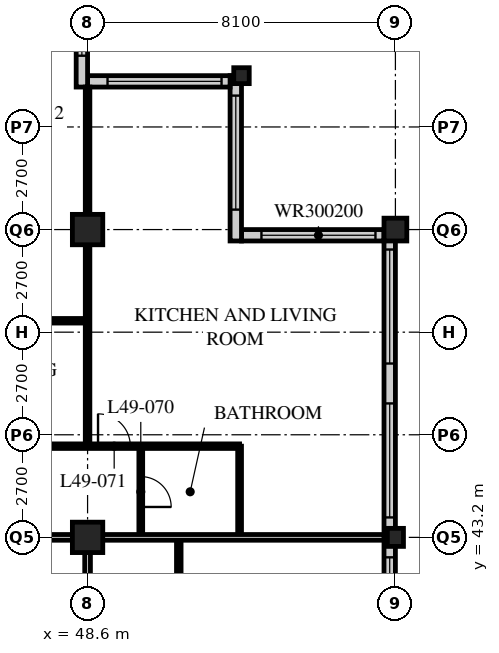
"""IFC4 building model, lengths in metres.
Left out: names, types, materials, properties, quantities, classifications, styles, units other than length and angle.
Written with IfcOpenShell. Run it as: python <this file> out.ifc"""

import sys

from ifc_helpers import new_model, si_unit, direction, frame, frame_2d, origin, origin_2d, place, context, subcontext, project, spatial, rectangle, hollow_rectangle, i_section, extrude, element, fill, save


model = new_model("IFC4")
c1 = context("Model", 3, precision=1e-05, world=origin(), true_north=direction((0.0, 1.0)))
c2 = subcontext(c1, "Body", "Model", "MODEL_VIEW")
j1 = project(units=[si_unit("LENGTHUNIT", "METRE"), si_unit("PLANEANGLEUNIT", "RADIAN")], contexts=[c1])
p1 = place(None, origin())
s1 = spatial("IfcSite", under=j1, at=p1, CompositionType="ELEMENT")
p2 = place(p1, origin())
s2 = spatial("IfcBuilding", under=s1, at=p2, CompositionType="ELEMENT")
p3 = place(p2, frame((0.0, 0.0, 192.0)))
s3 = spatial("IfcBuildingStorey", under=s2, at=p3, CompositionType="ELEMENT", Elevation=192.0)
for number, where, z_axis, x_axis in (
    (1, (48.6, 43.2, 0.0), (0.0, 0.0, 1.0), (1.0, 0.0, 0.0)),
    (2, (48.6, 51.3, 0.0), (0.0, 0.0, 1.0), (1.0, 0.0, 0.0)),
):
    element("IfcColumn", number, at=place(p3, frame(where, z_axis=z_axis, x_axis=x_axis)), inside=s3, PredefinedType="COLUMN", context=c2, shape_type="SweptSolid", body=[
        extrude(hollow_rectangle(XDim=0.8, YDim=0.8, WallThickness=0.08, at=origin_2d()), origin(), (0.0, 0.0, 1.0), 3.6),
    ])
p4 = place(p3, frame((52.65, 55.35, 0.0), z_axis=(0.0, 0.0, 1.0), x_axis=(1.0, 0.0, 0.0)))
e3 = element("IfcColumn", 3, at=p4, inside=s3, PredefinedType="COLUMN", context=c2, shape_type="SweptSolid", body=[
    extrude(i_section(OverallWidth=0.407, OverallDepth=0.419, WebThickness=0.031, FlangeThickness=0.049, FilletRadius=0.015, at=origin_2d()), origin(), (0.0, 0.0, 1.0), 3.6),
])
p5 = place(p3, frame((56.7, 43.2, 0.0), z_axis=(0.0, 0.0, 1.0), x_axis=(1.0, 0.0, 0.0)))
e4 = element("IfcColumn", 4, at=p5, inside=s3, PredefinedType="COLUMN", context=c2, shape_type="SweptSolid", body=[
    extrude(i_section(OverallWidth=0.424, OverallDepth=0.475, WebThickness=0.048, FlangeThickness=0.077, FilletRadius=0.015, at=origin_2d()), origin(), (0.0, 0.0, 1.0), 3.6),
])
p6 = place(p3, frame((56.7, 51.3, 0.0), z_axis=(0.0, 0.0, 1.0), x_axis=(1.0, 0.0, 0.0)))
e5 = element("IfcColumn", 5, at=p6, inside=s3, PredefinedType="COLUMN", context=c2, shape_type="SweptSolid", body=[
    extrude(hollow_rectangle(XDim=0.6, YDim=0.6, WallThickness=0.05, at=origin_2d()), origin(), (0.0, 0.0, 1.0), 3.6),
])
p7 = place(p3, frame((56.55, 19.2, 0.0), z_axis=(0.0, 0.0, 1.0), x_axis=(0.0, 1.0, 0.0)))
e6 = element("IfcWall", 6, at=p7, inside=s3, PredefinedType="SOLIDWALL", context=c2, shape_type="SweptSolid", body=[
    extrude(rectangle(XDim=32.1, YDim=0.3, at=frame_2d((16.05, 0.0))), origin(), (0.0, 0.0, 1.0), 3.39),
])
p8 = place(p7, frame((0.225, 0.0, 0.6)))
e7 = element("IfcOpeningElement", 7, at=p8, cuts=e6, PredefinedType="OPENING", context=c2, shape_type="SweptSolid", body=[
    extrude(rectangle(XDim=3.0, YDim=2.4, at=frame_2d((1.5, 1.2))), frame((0.0, 0.16, 0.0), z_axis=(0.0, -1.0, 0.0), x_axis=(1.0, 0.0, 0.0)), (0.0, 0.0, 1.0), 0.32),
])
p9 = place(p7, frame((4.275, 0.0, 0.6)))
e8 = element("IfcOpeningElement", 8, at=p9, cuts=e6, PredefinedType="OPENING", context=c2, shape_type="SweptSolid", body=[
    extrude(rectangle(XDim=3.0, YDim=2.4, at=frame_2d((1.5, 1.2))), frame((0.0, 0.16, 0.0), z_axis=(0.0, -1.0, 0.0), x_axis=(1.0, 0.0, 0.0)), (0.0, 0.0, 1.0), 0.32),
])
p10 = place(p7, frame((8.325, 0.0, 0.6)))
e9 = element("IfcOpeningElement", 9, at=p10, cuts=e6, PredefinedType="OPENING", context=c2, shape_type="SweptSolid", body=[
    extrude(rectangle(XDim=3.0, YDim=2.4, at=frame_2d((1.5, 1.2))), frame((0.0, 0.16, 0.0), z_axis=(0.0, -1.0, 0.0), x_axis=(1.0, 0.0, 0.0)), (0.0, 0.0, 1.0), 0.32),
])
p11 = place(p7, frame((12.375, 0.0, 0.6)))
e10 = element("IfcOpeningElement", 10, at=p11, cuts=e6, PredefinedType="OPENING", context=c2, shape_type="SweptSolid", body=[
    extrude(rectangle(XDim=3.0, YDim=2.4, at=frame_2d((1.5, 1.2))), frame((0.0, 0.16, 0.0), z_axis=(0.0, -1.0, 0.0), x_axis=(1.0, 0.0, 0.0)), (0.0, 0.0, 1.0), 0.32),
])
p12 = place(p7, frame((16.425, 0.0, 0.6)))
e11 = element("IfcOpeningElement", 11, at=p12, cuts=e6, PredefinedType="OPENING", context=c2, shape_type="SweptSolid", body=[
    extrude(rectangle(XDim=3.0, YDim=2.4, at=frame_2d((1.5, 1.2))), frame((0.0, 0.16, 0.0), z_axis=(0.0, -1.0, 0.0), x_axis=(1.0, 0.0, 0.0)), (0.0, 0.0, 1.0), 0.32),
])
p13 = place(p7, frame((20.475, 0.0, 0.6)))
e12 = element("IfcOpeningElement", 12, at=p13, cuts=e6, PredefinedType="OPENING", context=c2, shape_type="SweptSolid", body=[
    extrude(rectangle(XDim=3.0, YDim=2.4, at=frame_2d((1.5, 1.2))), frame((0.0, 0.16, 0.0), z_axis=(0.0, -1.0, 0.0), x_axis=(1.0, 0.0, 0.0)), (0.0, 0.0, 1.0), 0.32),
])
p14 = place(p7, frame((24.525, 0.0, 0.6)))
e13 = element("IfcOpeningElement", 13, at=p14, cuts=e6, PredefinedType="OPENING", context=c2, shape_type="SweptSolid", body=[
    extrude(rectangle(XDim=3.0, YDim=2.4, at=frame_2d((1.5, 1.2))), frame((0.0, 0.16, 0.0), z_axis=(0.0, -1.0, 0.0), x_axis=(1.0, 0.0, 0.0)), (0.0, 0.0, 1.0), 0.32),
])
p15 = place(p7, frame((28.575, 0.0, 0.6)))
e14 = element("IfcOpeningElement", 14, at=p15, cuts=e6, PredefinedType="OPENING", context=c2, shape_type="SweptSolid", body=[
    extrude(rectangle(XDim=3.0, YDim=2.4, at=frame_2d((1.5, 1.2))), frame((0.0, 0.16, 0.0), z_axis=(0.0, -1.0, 0.0), x_axis=(1.0, 0.0, 0.0)), (0.0, 0.0, 1.0), 0.32),
])
p16 = place(p3, frame((56.4, 51.15, 0.0), z_axis=(0.0, 0.0, 1.0), x_axis=(-1.0, 0.0, 0.0)))
e15 = element("IfcWall", 15, at=p16, inside=s3, PredefinedType="SOLIDWALL", context=c2, shape_type="SweptSolid", body=[
    extrude(rectangle(XDim=3.75, YDim=0.3, at=frame_2d((1.875, 0.0))), origin(), (0.0, 0.0, 1.0), 3.39),
])
p17 = place(p16, frame((0.225, 0.0, 0.6)))
e16 = element("IfcOpeningElement", 16, at=p17, cuts=e15, PredefinedType="OPENING", context=c2, shape_type="SweptSolid", body=[
    extrude(rectangle(XDim=3.0, YDim=2.0, at=frame_2d((1.5, 1.0))), frame((0.0, 0.16, 0.0), z_axis=(0.0, -1.0, 0.0), x_axis=(1.0, 0.0, 0.0)), (0.0, 0.0, 1.0), 0.32),
])
p18 = place(p3, frame((52.5, 51.0, 0.0), z_axis=(0.0, 0.0, 1.0), x_axis=(0.0, 1.0, 0.0)))
e17 = element("IfcWall", 17, at=p18, inside=s3, PredefinedType="SOLIDWALL", context=c2, shape_type="SweptSolid", body=[
    extrude(rectangle(XDim=4.35, YDim=0.3, at=frame_2d((2.175, 0.0))), origin(), (0.0, 0.0, 1.0), 3.39),
])
p19 = place(p18, frame((0.825, 0.0, 0.6)))
e18 = element("IfcOpeningElement", 18, at=p19, cuts=e17, PredefinedType="OPENING", context=c2, shape_type="SweptSolid", body=[
    extrude(rectangle(XDim=3.0, YDim=2.0, at=frame_2d((1.5, 1.0))), frame((0.0, 0.16, 0.0), z_axis=(0.0, -1.0, 0.0), x_axis=(1.0, 0.0, 0.0)), (0.0, 0.0, 1.0), 0.32),
])
p20 = place(p3, frame((52.35, 55.2, 0.0), z_axis=(0.0, 0.0, 1.0), x_axis=(-1.0, 0.0, 0.0)))
e19 = element("IfcWall", 19, at=p20, inside=s3, PredefinedType="SOLIDWALL", context=c2, shape_type="SweptSolid", body=[
    extrude(rectangle(XDim=3.75, YDim=0.3, at=frame_2d((1.875, 0.0))), origin(), (0.0, 0.0, 1.0), 3.39),
])
p21 = place(p20, frame((0.225, 0.0, 0.6)))
e20 = element("IfcOpeningElement", 20, at=p21, cuts=e19, PredefinedType="OPENING", context=c2, shape_type="SweptSolid", body=[
    extrude(rectangle(XDim=3.0, YDim=2.0, at=frame_2d((1.5, 1.0))), frame((0.0, 0.16, 0.0), z_axis=(0.0, -1.0, 0.0), x_axis=(1.0, 0.0, 0.0)), (0.0, 0.0, 1.0), 0.32),
])
p22 = place(p3, frame((48.45, 55.05, 0.0), z_axis=(0.0, 0.0, 1.0), x_axis=(0.0, 1.0, 0.0)))
e21 = element("IfcWall", 21, at=p22, inside=s3, PredefinedType="SOLIDWALL", context=c2, shape_type="SweptSolid", body=[
    extrude(rectangle(XDim=4.35, YDim=0.3, at=frame_2d((2.175, 0.0))), origin(), (0.0, 0.0, 1.0), 3.39),
])
p23 = place(p22, frame((0.825, 0.0, 0.6)))
e22 = element("IfcOpeningElement", 22, at=p23, cuts=e21, PredefinedType="OPENING", context=c2, shape_type="SweptSolid", body=[
    extrude(rectangle(XDim=3.0, YDim=2.0, at=frame_2d((1.5, 1.0))), frame((0.0, 0.16, 0.0), z_axis=(0.0, -1.0, 0.0), x_axis=(1.0, 0.0, 0.0)), (0.0, 0.0, 1.0), 0.32),
])
p24 = place(p3, frame((8.1, 43.2, 0.0), z_axis=(0.0, 0.0, 1.0), x_axis=(1.0, 0.0, 0.0)))
e23 = element("IfcWall", 23, at=p24, inside=s3, PredefinedType="PARTITIONING", context=c2, shape_type="SweptSolid", body=[
    extrude(rectangle(XDim=40.5, YDim=0.15, at=frame_2d((20.25, 0.0))), origin(), (0.0, 0.0, 1.0), 2.778),
])
p25 = place(p24, frame((4.45, 0.0, 0.0)))
e24 = element("IfcOpeningElement", 24, at=p25, cuts=e23, PredefinedType="OPENING", context=c2, shape_type="SweptSolid", body=[
    extrude(rectangle(XDim=1.0, YDim=2.1, at=frame_2d((0.5, 1.05))), frame((0.0, 0.085, 0.0), z_axis=(0.0, -1.0, 0.0), x_axis=(1.0, 0.0, 0.0)), (0.0, 0.0, 1.0), 0.17),
])
p26 = place(p24, frame((20.65, 0.0, 0.0)))
e25 = element("IfcOpeningElement", 25, at=p26, cuts=e23, PredefinedType="OPENING", context=c2, shape_type="SweptSolid", body=[
    extrude(rectangle(XDim=1.0, YDim=2.1, at=frame_2d((0.5, 1.05))), frame((0.0, 0.085, 0.0), z_axis=(0.0, -1.0, 0.0), x_axis=(1.0, 0.0, 0.0)), (0.0, 0.0, 1.0), 0.17),
])
p27 = place(p24, frame((28.75, 0.0, 0.0)))
e26 = element("IfcOpeningElement", 26, at=p27, cuts=e23, PredefinedType="OPENING", context=c2, shape_type="SweptSolid", body=[
    extrude(rectangle(XDim=1.0, YDim=2.1, at=frame_2d((0.5, 1.05))), frame((0.0, 0.085, 0.0), z_axis=(0.0, -1.0, 0.0), x_axis=(1.0, 0.0, 0.0)), (0.0, 0.0, 1.0), 0.17),
])
p28 = place(p24, frame((37.975, 0.0, 0.0)))
e27 = element("IfcOpeningElement", 27, at=p28, cuts=e23, PredefinedType="OPENING", context=c2, shape_type="SweptSolid", body=[
    extrude(rectangle(XDim=1.0, YDim=2.1, at=frame_2d((0.5, 1.05))), frame((0.0, 0.085, 0.0), z_axis=(0.0, -1.0, 0.0), x_axis=(1.0, 0.0, 0.0)), (0.0, 0.0, 1.0), 0.17),
])
p29 = place(p24, frame((1.525, 0.0, 0.0)))
e28 = element("IfcOpeningElement", 28, at=p29, cuts=e23, PredefinedType="OPENING", context=c2, shape_type="SweptSolid", body=[
    extrude(rectangle(XDim=1.0, YDim=2.1, at=frame_2d((0.5, 1.05))), frame((0.0, 0.085, 0.0), z_axis=(0.0, -1.0, 0.0), x_axis=(1.0, 0.0, 0.0)), (0.0, 0.0, 1.0), 0.17),
])
p30 = place(p3, frame((48.6, 18.9, 0.0), z_axis=(0.0, 0.0, 1.0), x_axis=(0.0, 1.0, 0.0)))
e29 = element("IfcWall", 29, at=p30, inside=s3, PredefinedType="PARTITIONING", context=c2, shape_type="SweptSolid", body=[
    extrude(rectangle(XDim=24.3, YDim=0.15, at=frame_2d((12.15, 0.0))), origin(), (0.0, 0.0, 1.0), 2.778),
])
p31 = place(p30, frame((2.35, 0.0, 0.0)))
e30 = element("IfcOpeningElement", 30, at=p31, cuts=e29, PredefinedType="OPENING", context=c2, shape_type="SweptSolid", body=[
    extrude(rectangle(XDim=1.0, YDim=2.1, at=frame_2d((0.5, 1.05))), frame((0.0, 0.085, 0.0), z_axis=(0.0, -1.0, 0.0), x_axis=(1.0, 0.0, 0.0)), (0.0, 0.0, 1.0), 0.17),
])
p32 = place(p30, frame((4.75, 0.0, 0.0)))
e31 = element("IfcOpeningElement", 31, at=p32, cuts=e29, PredefinedType="OPENING", context=c2, shape_type="SweptSolid", body=[
    extrude(rectangle(XDim=1.0, YDim=2.1, at=frame_2d((0.5, 1.05))), frame((0.0, 0.085, 0.0), z_axis=(0.0, -1.0, 0.0), x_axis=(1.0, 0.0, 0.0)), (0.0, 0.0, 1.0), 0.17),
])
p33 = place(p30, frame((9.0, 0.0, 0.0)))
e32 = element("IfcOpeningElement", 32, at=p33, cuts=e29, PredefinedType="OPENING", context=c2, shape_type="SweptSolid", body=[
    extrude(rectangle(XDim=1.0, YDim=2.1, at=frame_2d((0.5, 1.05))), frame((0.0, 0.085, 0.0), z_axis=(0.0, -1.0, 0.0), x_axis=(1.0, 0.0, 0.0)), (0.0, 0.0, 1.0), 0.17),
])
p34 = place(p3, frame((51.0, 27.0, 0.0), z_axis=(0.0, 0.0, 1.0), x_axis=(0.0, 1.0, 0.0)))
e33 = element("IfcWall", 33, at=p34, inside=s3, PredefinedType="PARTITIONING", context=c2, shape_type="SweptSolid", body=[
    extrude(rectangle(XDim=16.2, YDim=0.12, at=frame_2d((8.1, 0.0))), origin(), (0.0, 0.0, 1.0), 3.39),
])
p35 = place(p34, frame((0.975, 0.0, 0.0)))
e34 = element("IfcOpeningElement", 34, at=p35, cuts=e33, PredefinedType="OPENING", context=c2, shape_type="SweptSolid", body=[
    extrude(rectangle(XDim=0.85, YDim=2.1, at=frame_2d((0.425, 1.05))), frame((0.0, 0.07, 0.0), z_axis=(0.0, -1.0, 0.0), x_axis=(1.0, 0.0, 0.0)), (0.0, 0.0, 1.0), 0.14),
])
p36 = place(p34, frame((8.425, 0.0, 0.0)))
e35 = element("IfcOpeningElement", 35, at=p36, cuts=e33, PredefinedType="OPENING", context=c2, shape_type="SweptSolid", body=[
    extrude(rectangle(XDim=0.85, YDim=2.1, at=frame_2d((0.425, 1.05))), frame((0.0, 0.07, 0.0), z_axis=(0.0, -1.0, 0.0), x_axis=(1.0, 0.0, 0.0)), (0.0, 0.0, 1.0), 0.14),
])
p37 = place(p34, frame((12.475, 0.0, 0.0)))
e36 = element("IfcOpeningElement", 36, at=p37, cuts=e33, PredefinedType="OPENING", context=c2, shape_type="SweptSolid", body=[
    extrude(rectangle(XDim=0.85, YDim=2.1, at=frame_2d((0.425, 1.05))), frame((0.0, 0.07, 0.0), z_axis=(0.0, -1.0, 0.0), x_axis=(1.0, 0.0, 0.0)), (0.0, 0.0, 1.0), 0.14),
])
p38 = place(p3, frame((50.0, 43.2, 0.0), z_axis=(0.0, 0.0, 1.0), x_axis=(0.0, 1.0, 0.0)))
e37 = element("IfcWall", 37, at=p38, inside=s3, PredefinedType="PARTITIONING", context=c2, shape_type="SweptSolid", body=[
    extrude(rectangle(XDim=2.4, YDim=0.1, at=frame_2d((1.2, 0.0))), origin(), (0.0, 0.0, 1.0), 3.39),
])
p39 = place(p38, frame((0.8, 0.0, 0.0)))
e38 = element("IfcOpeningElement", 38, at=p39, cuts=e37, PredefinedType="OPENING", context=c2, shape_type="SweptSolid", body=[
    extrude(rectangle(XDim=0.8, YDim=2.1, at=frame_2d((0.4, 1.05))), frame((0.0, 0.06, 0.0), z_axis=(0.0, -1.0, 0.0), x_axis=(1.0, 0.0, 0.0)), (0.0, 0.0, 1.0), 0.12),
])
p40 = place(p3, frame((52.6, 43.2, 0.0), z_axis=(0.0, 0.0, 1.0), x_axis=(0.0, 1.0, 0.0)))
e39 = element("IfcWall", 39, at=p40, inside=s3, PredefinedType="PARTITIONING", context=c2, shape_type="SweptSolid", body=[
    extrude(rectangle(XDim=2.4, YDim=0.1, at=frame_2d((1.2, 0.0))), origin(), (0.0, 0.0, 1.0), 3.39),
])
p41 = place(p3, frame((48.6, 45.6, 0.0), z_axis=(0.0, 0.0, 1.0), x_axis=(0.0, 1.0, 0.0)))
e40 = element("IfcWall", 40, at=p41, inside=s3, PredefinedType="PARTITIONING", context=c2, shape_type="SweptSolid", body=[
    extrude(rectangle(XDim=9.45, YDim=0.12, at=frame_2d((4.725, 0.0))), origin(), (0.0, 0.0, 1.0), 2.778),
])
p42 = place(p3, frame((48.6, 43.2, 0.0), z_axis=(0.0, 0.0, 1.0), x_axis=(1.0, 0.0, 0.0)))
e41 = element("IfcWall", 41, at=p42, inside=s3, PredefinedType="PARTITIONING", context=c2, shape_type="SweptSolid", body=[
    extrude(rectangle(XDim=7.8, YDim=0.15, at=frame_2d((3.9, 0.0))), origin(), (0.0, 0.0, 1.0), 2.778),
])
p43 = place(p3, frame((4.1, 45.6, 0.0), z_axis=(0.0, 0.0, 1.0), x_axis=(1.0, 0.0, 0.0)))
e42 = element("IfcWall", 42, at=p43, inside=s3, PredefinedType="PARTITIONING", context=c2, shape_type="SweptSolid", body=[
    extrude(rectangle(XDim=48.5, YDim=0.12, at=frame_2d((24.25, 0.0))), origin(), (0.0, 0.0, 1.0), 3.39),
])
p44 = place(p43, frame((9.025, 0.0, 0.0)))
e43 = element("IfcOpeningElement", 43, at=p44, cuts=e42, PredefinedType="OPENING", context=c2, shape_type="SweptSolid", body=[
    extrude(rectangle(XDim=0.85, YDim=2.1, at=frame_2d((0.425, 1.05))), frame((0.0, 0.07, 0.0), z_axis=(0.0, -1.0, 0.0), x_axis=(1.0, 0.0, 0.0)), (0.0, 0.0, 1.0), 0.14),
])
p45 = place(p43, frame((16.475, 0.0, 0.0)))
e44 = element("IfcOpeningElement", 44, at=p45, cuts=e42, PredefinedType="OPENING", context=c2, shape_type="SweptSolid", body=[
    extrude(rectangle(XDim=0.85, YDim=2.1, at=frame_2d((0.425, 1.05))), frame((0.0, 0.07, 0.0), z_axis=(0.0, -1.0, 0.0), x_axis=(1.0, 0.0, 0.0)), (0.0, 0.0, 1.0), 0.14),
])
p46 = place(p43, frame((20.525, 0.0, 0.0)))
e45 = element("IfcOpeningElement", 45, at=p46, cuts=e42, PredefinedType="OPENING", context=c2, shape_type="SweptSolid", body=[
    extrude(rectangle(XDim=0.85, YDim=2.1, at=frame_2d((0.425, 1.05))), frame((0.0, 0.07, 0.0), z_axis=(0.0, -1.0, 0.0), x_axis=(1.0, 0.0, 0.0)), (0.0, 0.0, 1.0), 0.14),
])
p47 = place(p43, frame((25.225, 0.0, 0.0)))
e46 = element("IfcOpeningElement", 46, at=p47, cuts=e42, PredefinedType="OPENING", context=c2, shape_type="SweptSolid", body=[
    extrude(rectangle(XDim=0.85, YDim=2.1, at=frame_2d((0.425, 1.05))), frame((0.0, 0.07, 0.0), z_axis=(0.0, -1.0, 0.0), x_axis=(1.0, 0.0, 0.0)), (0.0, 0.0, 1.0), 0.14),
])
p48 = place(p43, frame((28.625, 0.0, 0.0)))
e47 = element("IfcOpeningElement", 47, at=p48, cuts=e42, PredefinedType="OPENING", context=c2, shape_type="SweptSolid", body=[
    extrude(rectangle(XDim=0.85, YDim=2.1, at=frame_2d((0.425, 1.05))), frame((0.0, 0.07, 0.0), z_axis=(0.0, -1.0, 0.0), x_axis=(1.0, 0.0, 0.0)), (0.0, 0.0, 1.0), 0.14),
])
p49 = place(p43, frame((33.325, 0.0, 0.0)))
e48 = element("IfcOpeningElement", 48, at=p49, cuts=e42, PredefinedType="OPENING", context=c2, shape_type="SweptSolid", body=[
    extrude(rectangle(XDim=0.85, YDim=2.1, at=frame_2d((0.425, 1.05))), frame((0.0, 0.07, 0.0), z_axis=(0.0, -1.0, 0.0), x_axis=(1.0, 0.0, 0.0)), (0.0, 0.0, 1.0), 0.14),
])
p50 = place(p43, frame((36.725, 0.0, 0.0)))
e49 = element("IfcOpeningElement", 49, at=p50, cuts=e42, PredefinedType="OPENING", context=c2, shape_type="SweptSolid", body=[
    extrude(rectangle(XDim=0.85, YDim=2.1, at=frame_2d((0.425, 1.05))), frame((0.0, 0.07, 0.0), z_axis=(0.0, -1.0, 0.0), x_axis=(1.0, 0.0, 0.0)), (0.0, 0.0, 1.0), 0.14),
])
p51 = place(p43, frame((40.925, 0.0, 0.0)))
e50 = element("IfcOpeningElement", 50, at=p51, cuts=e42, PredefinedType="OPENING", context=c2, shape_type="SweptSolid", body=[
    extrude(rectangle(XDim=0.85, YDim=2.1, at=frame_2d((0.425, 1.05))), frame((0.0, 0.07, 0.0), z_axis=(0.0, -1.0, 0.0), x_axis=(1.0, 0.0, 0.0)), (0.0, 0.0, 1.0), 0.14),
])
p52 = place(p43, frame((44.775, 0.0, 0.0)))
e51 = element("IfcOpeningElement", 51, at=p52, cuts=e42, PredefinedType="OPENING", context=c2, shape_type="SweptSolid", body=[
    extrude(rectangle(XDim=0.85, YDim=2.1, at=frame_2d((0.425, 1.05))), frame((0.0, 0.07, 0.0), z_axis=(0.0, -1.0, 0.0), x_axis=(1.0, 0.0, 0.0)), (0.0, 0.0, 1.0), 0.14),
])
p53 = place(p43, frame((6.725, 0.0, 0.0)))
e52 = element("IfcOpeningElement", 52, at=p53, cuts=e42, PredefinedType="OPENING", context=c2, shape_type="SweptSolid", body=[
    extrude(rectangle(XDim=0.85, YDim=2.1, at=frame_2d((0.425, 1.05))), frame((0.0, 0.07, 0.0), z_axis=(0.0, -1.0, 0.0), x_axis=(1.0, 0.0, 0.0)), (0.0, 0.0, 1.0), 0.14),
])
p54 = place(p43, frame((2.875, 0.0, 0.0)))
e53 = element("IfcOpeningElement", 53, at=p54, cuts=e42, PredefinedType="OPENING", context=c2, shape_type="SweptSolid", body=[
    extrude(rectangle(XDim=0.85, YDim=2.1, at=frame_2d((0.425, 1.05))), frame((0.0, 0.07, 0.0), z_axis=(0.0, -1.0, 0.0), x_axis=(1.0, 0.0, 0.0)), (0.0, 0.0, 1.0), 0.14),
])
p55 = place(p3, frame((40.5, 48.9, 0.0), z_axis=(0.0, 0.0, 1.0), x_axis=(1.0, 0.0, 0.0)))
e54 = element("IfcWall", 54, at=p55, inside=s3, PredefinedType="PARTITIONING", context=c2, shape_type="SweptSolid", body=[
    extrude(rectangle(XDim=8.1, YDim=0.12, at=frame_2d((4.05, 0.0))), origin(), (0.0, 0.0, 1.0), 3.39),
])
p56 = place(p55, frame((1.6, 0.0, 0.0)))
e55 = element("IfcOpeningElement", 55, at=p56, cuts=e54, PredefinedType="OPENING", context=c2, shape_type="SweptSolid", body=[
    extrude(rectangle(XDim=0.85, YDim=2.1, at=frame_2d((0.425, 1.05))), frame((0.0, 0.07, 0.0), z_axis=(0.0, -1.0, 0.0), x_axis=(1.0, 0.0, 0.0)), (0.0, 0.0, 1.0), 0.14),
])
p57 = place(p55, frame((5.65, 0.0, 0.0)))
e56 = element("IfcOpeningElement", 56, at=p57, cuts=e54, PredefinedType="OPENING", context=c2, shape_type="SweptSolid", body=[
    extrude(rectangle(XDim=0.85, YDim=2.1, at=frame_2d((0.425, 1.05))), frame((0.0, 0.07, 0.0), z_axis=(0.0, -1.0, 0.0), x_axis=(1.0, 0.0, 0.0)), (0.0, 0.0, 1.0), 0.14),
])
p58 = place(p13, origin())
e57 = element("IfcWindow", 57, at=p58, inside=s3, PartitioningType="SINGLE_PANEL", PredefinedType="WINDOW", context=c2, shape_type="SweptSolid", body=[
    extrude(rectangle(XDim=3.0, YDim=2.4, at=frame_2d((1.5, 1.2))), frame((0.0, 0.03, 0.0), z_axis=(0.0, -1.0, 0.0), x_axis=(1.0, 0.0, 0.0)), (0.0, 0.0, 1.0), 0.06),
])
fill(e12, e57)
p59 = place(p14, origin())
e58 = element("IfcWindow", 58, at=p59, inside=s3, PartitioningType="SINGLE_PANEL", PredefinedType="WINDOW", context=c2, shape_type="SweptSolid", body=[
    extrude(rectangle(XDim=3.0, YDim=2.4, at=frame_2d((1.5, 1.2))), frame((0.0, 0.03, 0.0), z_axis=(0.0, -1.0, 0.0), x_axis=(1.0, 0.0, 0.0)), (0.0, 0.0, 1.0), 0.06),
])
fill(e13, e58)
p60 = place(p15, origin())
e59 = element("IfcWindow", 59, at=p60, inside=s3, PartitioningType="SINGLE_PANEL", PredefinedType="WINDOW", context=c2, shape_type="SweptSolid", body=[
    extrude(rectangle(XDim=3.0, YDim=2.4, at=frame_2d((1.5, 1.2))), frame((0.0, 0.03, 0.0), z_axis=(0.0, -1.0, 0.0), x_axis=(1.0, 0.0, 0.0)), (0.0, 0.0, 1.0), 0.06),
])
fill(e14, e59)
p61 = place(p17, origin())
e60 = element("IfcWindow", 60, at=p61, inside=s3, PartitioningType="SINGLE_PANEL", PredefinedType="WINDOW", context=c2, shape_type="SweptSolid", body=[
    extrude(rectangle(XDim=3.0, YDim=2.0, at=frame_2d((1.5, 1.0))), frame((0.0, 0.03, 0.0), z_axis=(0.0, -1.0, 0.0), x_axis=(1.0, 0.0, 0.0)), (0.0, 0.0, 1.0), 0.06),
])
fill(e16, e60)
p62 = place(p19, origin())
e61 = element("IfcWindow", 61, at=p62, inside=s3, PartitioningType="SINGLE_PANEL", PredefinedType="WINDOW", context=c2, shape_type="SweptSolid", body=[
    extrude(rectangle(XDim=3.0, YDim=2.0, at=frame_2d((1.5, 1.0))), frame((0.0, 0.03, 0.0), z_axis=(0.0, -1.0, 0.0), x_axis=(1.0, 0.0, 0.0)), (0.0, 0.0, 1.0), 0.06),
])
fill(e18, e61)
p63 = place(p21, origin())
e62 = element("IfcWindow", 62, at=p63, inside=s3, PartitioningType="SINGLE_PANEL", PredefinedType="WINDOW", context=c2, shape_type="SweptSolid", body=[
    extrude(rectangle(XDim=3.0, YDim=2.0, at=frame_2d((1.5, 1.0))), frame((0.0, 0.03, 0.0), z_axis=(0.0, -1.0, 0.0), x_axis=(1.0, 0.0, 0.0)), (0.0, 0.0, 1.0), 0.06),
])
fill(e20, e62)
p64 = place(p23, origin())
e63 = element("IfcWindow", 63, at=p64, inside=s3, PartitioningType="SINGLE_PANEL", PredefinedType="WINDOW", context=c2, shape_type="SweptSolid", body=[
    extrude(rectangle(XDim=3.0, YDim=2.0, at=frame_2d((1.5, 1.0))), frame((0.0, 0.03, 0.0), z_axis=(0.0, -1.0, 0.0), x_axis=(1.0, 0.0, 0.0)), (0.0, 0.0, 1.0), 0.06),
])
fill(e22, e63)
p65 = place(p39, origin())
e64 = element("IfcDoor", 64, at=p65, inside=s3, OperationType="SINGLE_SWING_RIGHT", PredefinedType="DOOR", context=c2, shape_type="SweptSolid", body=[
    extrude(rectangle(XDim=0.8, YDim=2.1, at=frame_2d((0.4, 1.05))), frame((0.0, 0.025, 0.0), z_axis=(0.0, -1.0, 0.0), x_axis=(1.0, 0.0, 0.0)), (0.0, 0.0, 1.0), 0.05),
])
fill(e38, e64)
p66 = place(p52, origin())
e65 = element("IfcDoor", 65, at=p66, inside=s3, OperationType="SINGLE_SWING_LEFT", PredefinedType="DOOR", context=c2, shape_type="SweptSolid", body=[
    extrude(rectangle(XDim=0.85, YDim=2.1, at=frame_2d((0.425, 1.05))), frame((0.0, 0.025, 0.0), z_axis=(0.0, -1.0, 0.0), x_axis=(1.0, 0.0, 0.0)), (0.0, 0.0, 1.0), 0.05),
])
fill(e51, e65)
save(model, sys.argv[1])
